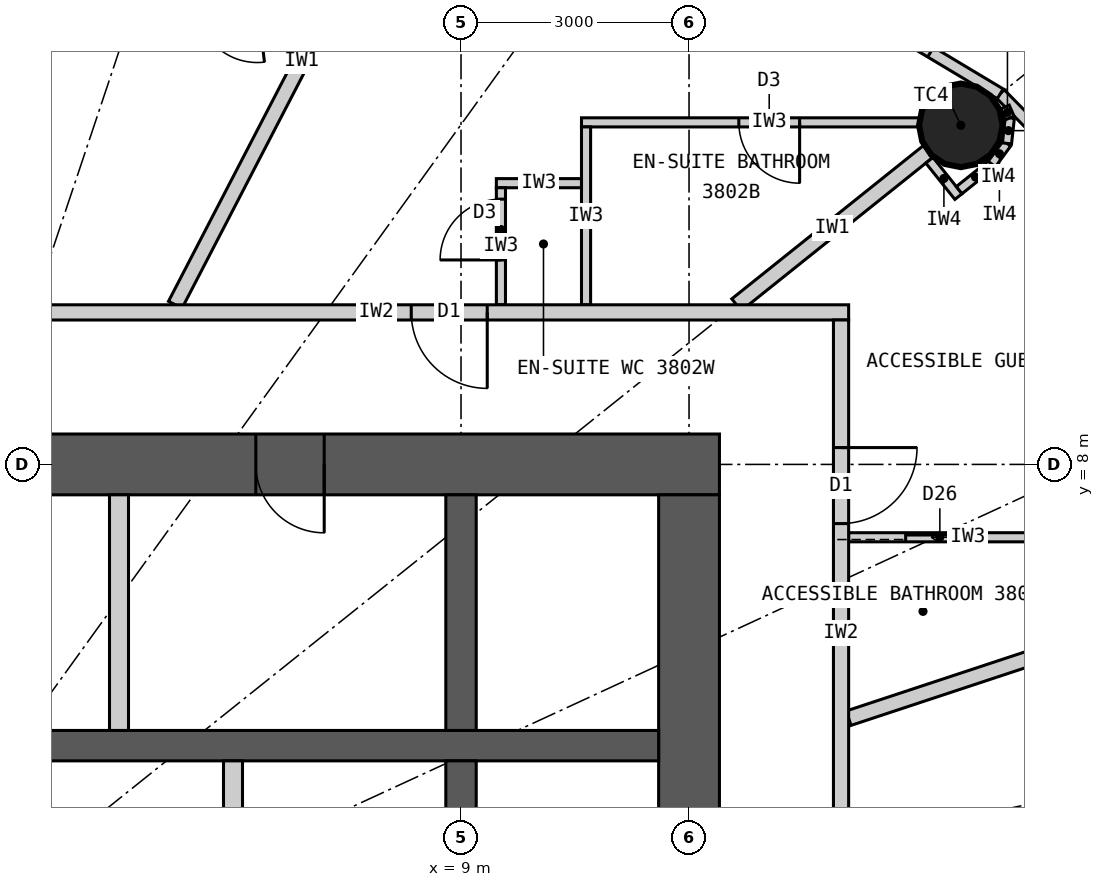
"""IFC4 building model, lengths in metres.
Left out: names, types, materials, properties, quantities, classifications, styles, units other than length and angle.
Written with IfcOpenShell. Run it as: python <this file> out.ifc"""

import sys

from ifc_helpers import new_model, si_unit, direction, frame, frame_2d, origin, origin_2d, place, context, subcontext, project, spatial, rectangle, circle, extrude, element, fill, save


model = new_model("IFC4")
c1 = context("Model", 3, precision=1e-05, world=origin(), true_north=direction((0.0, 1.0)))
c2 = subcontext(c1, "Body", "Model", "MODEL_VIEW")
j1 = project(units=[si_unit("LENGTHUNIT", "METRE"), si_unit("PLANEANGLEUNIT", "RADIAN")], contexts=[c1])
p1 = place(None, origin())
s1 = spatial("IfcSite", under=j1, at=p1, CompositionType="ELEMENT")
p2 = place(p1, origin())
s2 = spatial("IfcBuilding", under=s1, at=p2, CompositionType="ELEMENT")
p3 = place(p2, frame((0.0, 0.0, 146.7)))
s3 = spatial("IfcBuildingStorey", under=s2, at=p3, CompositionType="ELEMENT", Elevation=146.7)
p4 = place(p3, frame((15.576, 12.461, 0.0), z_axis=(0.0, 0.0, 1.0), x_axis=(1.0, 0.0, 0.0)))
e1 = element("IfcColumn", 1, at=p4, inside=s3, PredefinedType="COLUMN", context=c2, shape_type="SweptSolid", body=[
    extrude(circle(Radius=0.55, at=origin_2d()), origin(), (0.0, 0.0, 1.0), 3.3),
])
p5 = place(p3, frame((-12.4, 8.0, 0.0), z_axis=(0.0, 0.0, 1.0), x_axis=(1.0, 0.0, 0.0)))
e2 = element("IfcWall", 2, at=p5, inside=s3, PredefinedType="SHEAR", context=c2, shape_type="SweptSolid", body=[
    extrude(rectangle(XDim=24.8, YDim=0.8, at=frame_2d((12.4, 0.0))), origin(), (0.0, 0.0, 1.0), 3.3),
])
p6 = place(p5, frame((11.1, 0.0, 0.0)))
e3 = element("IfcOpeningElement", 3, at=p6, cuts=e2, PredefinedType="OPENING", context=c2, shape_type="SweptSolid", body=[
    extrude(rectangle(XDim=1.2, YDim=2.2, at=frame_2d((0.6, 1.1))), frame((0.0, 0.41, 0.0), z_axis=(0.0, -1.0, 0.0), x_axis=(1.0, 0.0, 0.0)), (0.0, 0.0, 1.0), 0.82),
])
p7 = place(p5, frame((18.7, 0.0, 0.0)))
e4 = element("IfcOpeningElement", 4, at=p7, cuts=e2, PredefinedType="OPENING", context=c2, shape_type="SweptSolid", body=[
    extrude(rectangle(XDim=0.9, YDim=2.2, at=frame_2d((0.45, 1.1))), frame((0.0, 0.41, 0.0), z_axis=(0.0, -1.0, 0.0), x_axis=(1.0, 0.0, 0.0)), (0.0, 0.0, 1.0), 0.82),
])
p8 = place(p3, frame((12.0, -7.6, 0.0), z_axis=(0.0, 0.0, 1.0), x_axis=(0.0, 1.0, 0.0)))
e5 = element("IfcWall", 5, at=p8, inside=s3, PredefinedType="SHEAR", context=c2, shape_type="SweptSolid", body=[
    extrude(rectangle(XDim=15.2, YDim=0.8, at=frame_2d((7.6, 0.0))), origin(), (0.0, 0.0, 1.0), 3.3),
])
p9 = place(p8, frame((6.7, 0.0, 0.0)))
e6 = element("IfcOpeningElement", 6, at=p9, cuts=e5, PredefinedType="OPENING", context=c2, shape_type="SweptSolid", body=[
    extrude(rectangle(XDim=1.8, YDim=2.2, at=frame_2d((0.9, 1.1))), frame((0.0, 0.41, 0.0), z_axis=(0.0, -1.0, 0.0), x_axis=(1.0, 0.0, 0.0)), (0.0, 0.0, 1.0), 0.82),
])
p10 = place(p3, frame((-11.6, 4.3, 0.0), z_axis=(0.0, 0.0, 1.0), x_axis=(1.0, 0.0, 0.0)))
e7 = element("IfcWall", 7, at=p10, inside=s3, PredefinedType="SHEAR", context=c2, shape_type="SweptSolid", body=[
    extrude(rectangle(XDim=23.2, YDim=0.4, at=frame_2d((11.6, 0.0))), origin(), (0.0, 0.0, 1.0), 3.3),
])
p11 = place(p3, frame((9.0, 4.5, 0.0), z_axis=(0.0, 0.0, 1.0), x_axis=(0.0, 1.0, 0.0)))
e8 = element("IfcWall", 8, at=p11, inside=s3, PredefinedType="SHEAR", context=c2, shape_type="SweptSolid", body=[
    extrude(rectangle(XDim=3.1, YDim=0.4, at=frame_2d((1.55, 0.0))), origin(), (0.0, 0.0, 1.0), 3.3),
])
p12 = place(p3, frame((9.0, 1.75, 0.0), z_axis=(0.0, 0.0, 1.0), x_axis=(0.0, 1.0, 0.0)))
e9 = element("IfcWall", 9, at=p12, inside=s3, PredefinedType="SHEAR", context=c2, shape_type="SweptSolid", body=[
    extrude(rectangle(XDim=2.35, YDim=0.4, at=frame_2d((1.175, 0.0))), origin(), (0.0, 0.0, 1.0), 3.3),
])
p13 = place(p3, frame((4.5, 4.5, 0.0), z_axis=(0.0, 0.0, 1.0), x_axis=(0.0, 1.0, 0.0)))
e10 = element("IfcWall", 10, at=p13, inside=s3, PredefinedType="PARTITIONING", context=c2, shape_type="SweptSolid", body=[
    extrude(rectangle(XDim=3.1, YDim=0.25, at=frame_2d((1.55, 0.0))), origin(), (0.0, 0.0, 1.0), 3.3),
])
p14 = place(p3, frame((6.0, 1.75, 0.0), z_axis=(0.0, 0.0, 1.0), x_axis=(0.0, 1.0, 0.0)))
e11 = element("IfcWall", 11, at=p14, inside=s3, PredefinedType="PARTITIONING", context=c2, shape_type="SweptSolid", body=[
    extrude(rectangle(XDim=2.35, YDim=0.25, at=frame_2d((1.175, 0.0))), origin(), (0.0, 0.0, 1.0), 3.3),
])
p15 = place(p3, frame((19.772, 9.132, 0.0), z_axis=(0.0, 0.0, 1.0), x_axis=(-0.700727467776, 0.71342905457, 0.0)))
e12 = element("IfcWall", 12, at=p15, inside=s3, PredefinedType="ELEMENTEDWALL", context=c2, shape_type="SweptSolid", body=[
    extrude(rectangle(XDim=5.247, YDim=0.15, at=frame_2d((2.624, 0.0))), origin(), (0.0, 0.0, 1.0), 3.12),
])
p16 = place(p15, frame((0.924, 0.0, 0.9)))
e13 = element("IfcOpeningElement", 13, at=p16, cuts=e12, PredefinedType="OPENING", context=c2, shape_type="SweptSolid", body=[
    extrude(rectangle(XDim=1.4, YDim=1.9, at=frame_2d((0.7, 0.95))), frame((0.0, 0.085, 0.0), z_axis=(0.0, -1.0, 0.0), x_axis=(1.0, 0.0, 0.0)), (0.0, 0.0, 1.0), 0.17),
])
p17 = place(p15, frame((2.924, 0.0, 0.9)))
e14 = element("IfcOpeningElement", 14, at=p17, cuts=e12, PredefinedType="OPENING", context=c2, shape_type="SweptSolid", body=[
    extrude(rectangle(XDim=1.4, YDim=1.9, at=frame_2d((0.7, 0.95))), frame((0.0, 0.085, 0.0), z_axis=(0.0, -1.0, 0.0), x_axis=(1.0, 0.0, 0.0)), (0.0, 0.0, 1.0), 0.17),
])
p18 = place(p3, frame((16.095, 12.876, 0.0), z_axis=(0.0, 0.0, 1.0), x_axis=(-0.857695199231, 0.514158482587, 0.0)))
e15 = element("IfcWall", 15, at=p18, inside=s3, PredefinedType="ELEMENTEDWALL", context=c2, shape_type="SweptSolid", body=[
    extrude(rectangle(XDim=5.536, YDim=0.15, at=frame_2d((2.768, 0.0))), origin(), (0.0, 0.0, 1.0), 3.12),
])
p19 = place(p18, frame((1.068, 0.0, 0.9)))
e16 = element("IfcOpeningElement", 16, at=p19, cuts=e15, PredefinedType="OPENING", context=c2, shape_type="SweptSolid", body=[
    extrude(rectangle(XDim=1.4, YDim=1.9, at=frame_2d((0.7, 0.95))), frame((0.0, 0.085, 0.0), z_axis=(0.0, -1.0, 0.0), x_axis=(1.0, 0.0, 0.0)), (0.0, 0.0, 1.0), 0.17),
])
p20 = place(p18, frame((3.068, 0.0, 0.9)))
e17 = element("IfcOpeningElement", 17, at=p20, cuts=e15, PredefinedType="OPENING", context=c2, shape_type="SweptSolid", body=[
    extrude(rectangle(XDim=1.4, YDim=1.9, at=frame_2d((0.7, 0.95))), frame((0.0, 0.085, 0.0), z_axis=(0.0, -1.0, 0.0), x_axis=(1.0, 0.0, 0.0)), (0.0, 0.0, 1.0), 0.17),
])
p21 = place(p3, frame((14.1, 4.661, 0.0), z_axis=(0.0, 0.0, 1.0), x_axis=(0.949453216399, 0.313908569285, 0.0)))
e18 = element("IfcWall", 18, at=p21, inside=s3, PredefinedType="PARTITIONING", context=c2, shape_type="SweptSolid", body=[
    extrude(rectangle(XDim=7.109, YDim=0.2, at=frame_2d((3.554, 0.0))), origin(), (0.0, 0.0, 1.0), 3.12),
])
p22 = place(p3, frame((12.625, 10.1, 0.0), z_axis=(0.0, 0.0, 1.0), x_axis=(0.780876185034, 0.624685827954, 0.0)))
e19 = element("IfcWall", 19, at=p22, inside=s3, PredefinedType="PARTITIONING", context=c2, shape_type="SweptSolid", body=[
    extrude(rectangle(XDim=3.229, YDim=0.2, at=frame_2d((1.615, 0.0))), origin(), (0.0, 0.0, 1.0), 2.42),
])
p23 = place(p3, frame((5.24, 10.1, 0.0), z_axis=(0.0, 0.0, 1.0), x_axis=(0.460532965373, 0.887642601391, 0.0)))
e20 = element("IfcWall", 20, at=p23, inside=s3, PredefinedType="PARTITIONING", context=c2, shape_type="SweptSolid", body=[
    extrude(rectangle(XDim=7.231, YDim=0.2, at=frame_2d((3.616, 0.0))), origin(), (0.0, 0.0, 1.0), 3.12),
])
p24 = place(p3, frame((14.1, 7.042, 0.0), z_axis=(0.0, 0.0, 1.0), x_axis=(1.0, 0.0, 0.0)))
e21 = element("IfcWall", 21, at=p24, inside=s3, PredefinedType="PARTITIONING", context=c2, shape_type="SweptSolid", body=[
    extrude(rectangle(XDim=3.14, YDim=0.12, at=frame_2d((1.57, 0.0))), origin(), (0.0, 0.0, 1.0), 3.12),
])
p25 = place(p24, frame((0.75, 0.0, 0.0)))
e22 = element("IfcOpeningElement", 22, at=p25, cuts=e21, PredefinedType="OPENING", context=c2, shape_type="SweptSolid", body=[
    extrude(rectangle(XDim=0.9, YDim=2.1, at=frame_2d((0.45, 1.05))), frame((0.0, 0.07, 0.0), z_axis=(0.0, -1.0, 0.0), x_axis=(1.0, 0.0, 0.0)), (0.0, 0.0, 1.0), 0.14),
])
p26 = place(p3, frame((15.525, 12.5, 0.0), z_axis=(0.0, 0.0, 1.0), x_axis=(-1.0, 0.0, 0.0)))
e23 = element("IfcWall", 23, at=p26, inside=s3, PredefinedType="PARTITIONING", context=c2, shape_type="SweptSolid", body=[
    extrude(rectangle(XDim=4.94, YDim=0.12, at=frame_2d((2.47, 0.0))), origin(), (0.0, 0.0, 1.0), 3.12),
])
p27 = place(p26, frame((2.07, 0.0, 0.0)))
e24 = element("IfcOpeningElement", 24, at=p27, cuts=e23, PredefinedType="OPENING", context=c2, shape_type="SweptSolid", body=[
    extrude(rectangle(XDim=0.8, YDim=2.1, at=frame_2d((0.4, 1.05))), frame((0.0, 0.07, 0.0), z_axis=(0.0, -1.0, 0.0), x_axis=(1.0, 0.0, 0.0)), (0.0, 0.0, 1.0), 0.14),
])
p28 = place(p3, frame((10.645, 10.1, 0.0), z_axis=(0.0, 0.0, 1.0), x_axis=(0.0, 1.0, 0.0)))
e25 = element("IfcWall", 25, at=p28, inside=s3, PredefinedType="PARTITIONING", context=c2, shape_type="SweptSolid", body=[
    extrude(rectangle(XDim=2.34, YDim=0.12, at=frame_2d((1.17, 0.0))), origin(), (0.0, 0.0, 1.0), 3.12),
])
p29 = place(p3, frame((10.585, 11.7, 0.0), z_axis=(0.0, 0.0, 1.0), x_axis=(-1.0, 0.0, 0.0)))
e26 = element("IfcWall", 26, at=p29, inside=s3, PredefinedType="PARTITIONING", context=c2, shape_type="SweptSolid", body=[
    extrude(rectangle(XDim=1.12, YDim=0.12, at=frame_2d((0.56, 0.0))), origin(), (0.0, 0.0, 1.0), 3.12),
])
p30 = place(p3, frame((9.525, 10.1, 0.0), z_axis=(0.0, 0.0, 1.0), x_axis=(0.0, 1.0, 0.0)))
e27 = element("IfcWall", 27, at=p30, inside=s3, PredefinedType="PARTITIONING", context=c2, shape_type="SweptSolid", body=[
    extrude(rectangle(XDim=1.54, YDim=0.12, at=frame_2d((0.77, 0.0))), origin(), (0.0, 0.0, 1.0), 3.12),
])
p31 = place(p30, frame((0.59, 0.0, 0.0)))
e28 = element("IfcOpeningElement", 28, at=p31, cuts=e27, PredefinedType="OPENING", context=c2, shape_type="SweptSolid", body=[
    extrude(rectangle(XDim=0.8, YDim=2.1, at=frame_2d((0.4, 1.05))), frame((0.0, 0.07, 0.0), z_axis=(0.0, -1.0, 0.0), x_axis=(1.0, 0.0, 0.0)), (0.0, 0.0, 1.0), 0.14),
])
p32 = place(p3, frame((1.67, 10.0, 0.0), z_axis=(0.0, 0.0, 1.0), x_axis=(1.0, 0.0, 0.0)))
e29 = element("IfcWall", 29, at=p32, inside=s3, PredefinedType="PARTITIONING", context=c2, shape_type="SweptSolid", body=[
    extrude(rectangle(XDim=12.43, YDim=0.2, at=frame_2d((6.215, 0.0))), origin(), (0.0, 0.0, 1.0), 3.12),
])
p33 = place(p32, frame((6.675, 0.0, 0.0)))
e30 = element("IfcOpeningElement", 30, at=p33, cuts=e29, PredefinedType="OPENING", context=c2, shape_type="SweptSolid", body=[
    extrude(rectangle(XDim=1.0, YDim=2.2, at=frame_2d((0.5, 1.1))), frame((0.0, 0.11, 0.0), z_axis=(0.0, -1.0, 0.0), x_axis=(1.0, 0.0, 0.0)), (0.0, 0.0, 1.0), 0.22),
])
p34 = place(p3, frame((14.0, 1.67, 0.0), z_axis=(0.0, 0.0, 1.0), x_axis=(0.0, 1.0, 0.0)))
e31 = element("IfcWall", 31, at=p34, inside=s3, PredefinedType="PARTITIONING", context=c2, shape_type="SweptSolid", body=[
    extrude(rectangle(XDim=8.23, YDim=0.2, at=frame_2d((4.115, 0.0))), origin(), (0.0, 0.0, 1.0), 3.12),
])
p35 = place(p34, frame((5.552, 0.0, 0.0)))
e32 = element("IfcOpeningElement", 32, at=p35, cuts=e31, PredefinedType="OPENING", context=c2, shape_type="SweptSolid", body=[
    extrude(rectangle(XDim=1.0, YDim=2.2, at=frame_2d((0.5, 1.1))), frame((0.0, 0.11, 0.0), z_axis=(0.0, -1.0, 0.0), x_axis=(1.0, 0.0, 0.0)), (0.0, 0.0, 1.0), 0.22),
])
p36 = place(p3, frame((15.162, 12.002, 0.0), z_axis=(0.0, 0.0, 1.0), x_axis=(0.624597762427, -0.780946627607, 0.0)))
e33 = element("IfcWall", 33, at=p36, inside=s3, PredefinedType="PARTITIONING", context=c2, shape_type="SweptSolid", body=[
    extrude(rectangle(XDim=0.612, YDim=0.12, at=frame_2d((0.306, 0.0))), origin(), (0.0, 0.0, 1.0), 3.12),
])
p37 = place(p3, frame((15.554, 11.608, 0.0), z_axis=(0.0, 0.0, 1.0), x_axis=(0.780695577787, 0.624911525597, 0.0)))
e34 = element("IfcWall", 34, at=p37, inside=s3, PredefinedType="PARTITIONING", context=c2, shape_type="SweptSolid", body=[
    extrude(rectangle(XDim=0.55, YDim=0.12, at=frame_2d((0.275, 0.0))), origin(), (0.0, 0.0, 1.0), 3.12),
])
p38 = place(p3, frame((15.984, 11.952, 0.0), z_axis=(0.0, 0.0, 1.0), x_axis=(0.592335221171, 0.805691619517, 0.0)))
e35 = element("IfcWall", 35, at=p38, inside=s3, PredefinedType="PARTITIONING", context=c2, shape_type="SweptSolid", body=[
    extrude(rectangle(XDim=0.338, YDim=0.12, at=frame_2d((0.169, 0.0))), origin(), (0.0, 0.0, 1.0), 3.12),
])
p39 = place(p3, frame((16.184, 12.224, 0.0), z_axis=(0.0, 0.0, 1.0), x_axis=(0.110669692975, 0.993857242795, 0.0)))
e36 = element("IfcWall", 36, at=p39, inside=s3, PredefinedType="PARTITIONING", context=c2, shape_type="SweptSolid", body=[
    extrude(rectangle(XDim=0.337, YDim=0.12, at=frame_2d((0.169, 0.0))), origin(), (0.0, 0.0, 1.0), 3.12),
])
p40 = place(p3, frame((16.221, 12.559, 0.0), z_axis=(0.0, 0.0, 1.0), x_axis=(-0.401064416249, 0.916049853457, 0.0)))
e37 = element("IfcWall", 37, at=p40, inside=s3, PredefinedType="PARTITIONING", context=c2, shape_type="SweptSolid", body=[
    extrude(rectangle(XDim=0.156, YDim=0.12, at=frame_2d((0.078, 0.0))), origin(), (0.0, 0.0, 1.0), 3.12),
])
p41 = place(p19, origin())
e38 = element("IfcWindow", 38, at=p41, inside=s3, PartitioningType="SINGLE_PANEL", PredefinedType="WINDOW", context=c2, shape_type="SweptSolid", body=[
    extrude(rectangle(XDim=1.4, YDim=1.9, at=frame_2d((0.7, 0.95))), frame((0.0, 0.03, 0.0), z_axis=(0.0, -1.0, 0.0), x_axis=(1.0, 0.0, 0.0)), (0.0, 0.0, 1.0), 0.06),
])
fill(e16, e38)
p42 = place(p25, origin())
e39 = element("IfcDoor", 39, at=p42, inside=s3, OperationType="SLIDING_TO_LEFT", PredefinedType="DOOR", context=c2, shape_type="SweptSolid", body=[
    extrude(rectangle(XDim=0.9, YDim=2.1, at=frame_2d((0.45, 1.05))), frame((0.0, 0.025, 0.0), z_axis=(0.0, -1.0, 0.0), x_axis=(1.0, 0.0, 0.0)), (0.0, 0.0, 1.0), 0.05),
])
fill(e22, e39)
p43 = place(p35, origin())
e40 = element("IfcDoor", 40, at=p43, inside=s3, OperationType="SINGLE_SWING_RIGHT", PredefinedType="DOOR", context=c2, shape_type="SweptSolid", body=[
    extrude(rectangle(XDim=1.0, YDim=2.2, at=frame_2d((0.5, 1.1))), frame((0.0, 0.025, 0.0), z_axis=(0.0, -1.0, 0.0), x_axis=(1.0, 0.0, 0.0)), (0.0, 0.0, 1.0), 0.05),
])
fill(e32, e40)
p44 = place(p27, origin())
e41 = element("IfcDoor", 41, at=p44, inside=s3, OperationType="SINGLE_SWING_LEFT", PredefinedType="DOOR", context=c2, shape_type="SweptSolid", body=[
    extrude(rectangle(XDim=0.8, YDim=2.1, at=frame_2d((0.4, 1.05))), frame((0.0, 0.025, 0.0), z_axis=(0.0, -1.0, 0.0), x_axis=(1.0, 0.0, 0.0)), (0.0, 0.0, 1.0), 0.05),
])
fill(e24, e41)
p45 = place(p31, origin())
e42 = element("IfcDoor", 42, at=p45, inside=s3, OperationType="SINGLE_SWING_LEFT", PredefinedType="DOOR", context=c2, shape_type="SweptSolid", body=[
    extrude(rectangle(XDim=0.8, YDim=2.1, at=frame_2d((0.4, 1.05))), frame((0.0, 0.025, 0.0), z_axis=(0.0, -1.0, 0.0), x_axis=(1.0, 0.0, 0.0)), (0.0, 0.0, 1.0), 0.05),
])
fill(e28, e42)
p46 = place(p33, origin())
e43 = element("IfcDoor", 43, at=p46, inside=s3, OperationType="SINGLE_SWING_RIGHT", PredefinedType="DOOR", context=c2, shape_type="SweptSolid", body=[
    extrude(rectangle(XDim=1.0, YDim=2.2, at=frame_2d((0.5, 1.1))), frame((0.0, 0.025, 0.0), z_axis=(0.0, -1.0, 0.0), x_axis=(1.0, 0.0, 0.0)), (0.0, 0.0, 1.0), 0.05),
])
fill(e30, e43)
p47 = place(p7, origin())
e44 = element("IfcDoor", 44, at=p47, inside=s3, OperationType="SINGLE_SWING_RIGHT", PredefinedType="DOOR", context=c2, shape_type="SweptSolid", body=[
    extrude(rectangle(XDim=0.9, YDim=2.2, at=frame_2d((0.45, 1.1))), frame((0.0, 0.025, 0.0), z_axis=(0.0, -1.0, 0.0), x_axis=(1.0, 0.0, 0.0)), (0.0, 0.0, 1.0), 0.05),
])
fill(e4, e44)
save(model, sys.argv[1])
